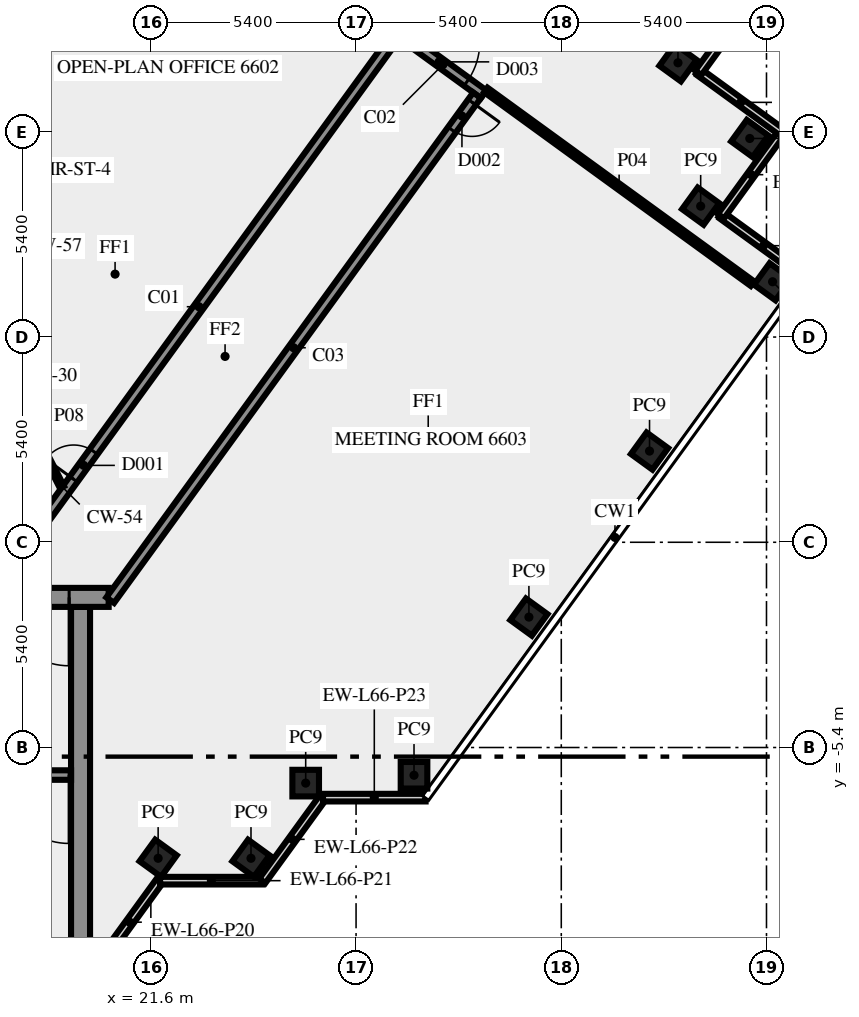
"""IFC4 building model, lengths in metres.
Left out: names, types, materials, properties, quantities, classifications, styles, units other than length and angle.
Written with IfcOpenShell. Run it as: python <this file> out.ifc"""

import sys

from ifc_helpers import new_model, si_unit, direction, frame, frame_2d, origin, origin_2d, place, context, subcontext, project, spatial, rectangle, extrude, element, fill, save


model = new_model("IFC4")
c1 = context("Model", 3, precision=1e-05, world=origin(), true_north=direction((0.0, 1.0)))
c2 = subcontext(c1, "Body", "Model", "MODEL_VIEW")
j1 = project(units=[si_unit("LENGTHUNIT", "METRE"), si_unit("PLANEANGLEUNIT", "RADIAN")], contexts=[c1])
p1 = place(None, origin())
s1 = spatial("IfcSite", under=j1, at=p1, CompositionType="ELEMENT")
p2 = place(p1, origin())
s2 = spatial("IfcBuilding", under=s1, at=p2, CompositionType="ELEMENT")
p3 = place(p2, frame((0.0, 0.0, 285.0)))
s3 = spatial("IfcBuildingStorey", under=s2, at=p3, CompositionType="ELEMENT", Elevation=285.0)
for number, where, z_axis, x_axis in (
    (1, (21.792, -8.315, 0.0), (0.0, 0.0, 1.0), (0.588, 0.809, 0.0)),
    (2, (24.235, -8.315, 0.0), (0.0, 0.0, 1.0), (0.588, 0.809, 0.0)),
    (3, (25.674, -6.337, 0.0), (0.0, 0.0, 1.0), (1.0, 0.0, 0.0)),
    (4, (28.525, -6.13, 0.0), (0.0, 0.0, 1.0), (1.0, 0.0, 0.0)),
    (5, (31.548, -1.969, 0.0), (0.0, 0.0, 1.0), (0.588, 0.809, 0.0)),
    (6, (34.722, 2.4, 0.0), (0.0, 0.0, 1.0), (0.588, 0.809, 0.0)),
    (7, (37.96, 6.855, 0.0), (0.0, 0.0, 1.0), (0.588, 0.809, 0.0)),
    (8, (36.068, 8.844, 0.0), (0.0, 0.0, 1.0), (0.588, 0.809, 0.0)),
    (9, (37.36, 10.625, 0.0), (0.0, 0.0, 1.0), (0.588, 0.809, 0.0)),
    (10, (35.471, 12.616, 0.0), (0.0, 0.0, 1.0), (-0.809, 0.588, 0.0)),
):
    element("IfcColumn", number, at=place(p3, frame(where, z_axis=z_axis, x_axis=x_axis)), inside=s3, PredefinedType="COLUMN", context=c2, shape_type="SweptSolid", body=[
        extrude(rectangle(XDim=0.7, YDim=0.7, at=origin_2d()), origin(), (0.0, 0.0, 1.0), 3.65),
    ])
p4 = place(p3, frame((20.253, -11.083, 0.0), z_axis=(0.0, 0.0, 1.0), x_axis=(0.587766567315, 0.809030569476, 0.0)))
e11 = element("IfcWall", 11, at=p4, inside=s3, PredefinedType="SOLIDWALL", context=c2, shape_type="SweptSolid", body=[
    extrude(rectangle(XDim=2.688, YDim=0.2, at=frame_2d((1.344, 0.0))), origin(), (0.0, 0.0, 1.0), 3.65),
])
p5 = place(p3, frame((21.843, -8.904, 0.0), z_axis=(0.0, 0.0, 1.0), x_axis=(1.0, 0.0, 0.0)))
e12 = element("IfcWall", 12, at=p5, inside=s3, PredefinedType="SOLIDWALL", context=c2, shape_type="SweptSolid", body=[
    extrude(rectangle(XDim=2.7, YDim=0.2, at=frame_2d((1.35, 0.0))), origin(), (0.0, 0.0, 1.0), 3.65),
])
p6 = place(p3, frame((24.533, -8.909, 0.0), z_axis=(0.0, 0.0, 1.0), x_axis=(0.587720002413, 0.809064397168, 0.0)))
e13 = element("IfcWall", 13, at=p6, inside=s3, PredefinedType="SOLIDWALL", context=c2, shape_type="SweptSolid", body=[
    extrude(rectangle(XDim=2.7, YDim=0.2, at=frame_2d((1.35, 0.0))), origin(), (0.0, 0.0, 1.0), 3.65),
])
for number, where, z_axis, x_axis in (
    (14, (26.13, -6.719, 0.0), (0.0, 0.0, 1.0), (1.0, 0.0, 0.0)),
    (15, (38.814, 7.01, 0.0), (0.0, 0.0, 1.0), (-0.809, 0.588, 0.0)),
    (16, (36.602, 8.58, 0.0), (0.0, 0.0, 1.0), (0.588, 0.809, 0.0)),
    (17, (38.216, 10.782, 0.0), (0.0, 0.0, 1.0), (-0.809, 0.588, 0.0)),
    (18, (36.005, 12.352, 0.0), (0.0, 0.0, 1.0), (0.588, 0.809, 0.0)),
):
    element("IfcWall", number, at=place(p3, frame(where, z_axis=z_axis, x_axis=x_axis)), inside=s3, PredefinedType="SOLIDWALL", context=c2, shape_type="SweptSolid", body=[
        extrude(rectangle(XDim=2.7, YDim=0.2, at=frame_2d((1.35, 0.0))), origin(), (0.0, 0.0, 1.0), 3.65),
    ])
p7 = place(p3, frame((19.75, -10.5, 0.0), z_axis=(0.0, 0.0, 1.0), x_axis=(0.0, 1.0, 0.0)))
e19 = element("IfcWall", 19, at=p7, inside=s3, PredefinedType="SHEAR", context=c2, shape_type="SweptSolid", body=[
    extrude(rectangle(XDim=8.8, YDim=0.5, at=frame_2d((4.4, 0.0))), origin(), (0.0, 0.0, 1.0), 3.65),
])
p8 = place(p3, frame((19.5, -6.125, 0.0), z_axis=(0.0, 0.0, 1.0), x_axis=(-1.0, 0.0, 0.0)))
e20 = element("IfcWall", 20, at=p8, inside=s3, PredefinedType="SHEAR", context=c2, shape_type="SweptSolid", body=[
    extrude(rectangle(XDim=8.05, YDim=0.25, at=frame_2d((4.025, 0.0))), origin(), (0.0, 0.0, 1.0), 3.65),
])
p9 = place(p8, frame((0.05, 0.0, 0.0)))
e21 = element("IfcOpeningElement", 21, at=p9, cuts=e20, PredefinedType="OPENING", context=c2, shape_type="SweptSolid", body=[
    extrude(rectangle(XDim=1.8, YDim=2.1, at=frame_2d((0.9, 1.05))), frame((0.0, 0.135, 0.0), z_axis=(0.0, -1.0, 0.0), x_axis=(1.0, 0.0, 0.0)), (0.0, 0.0, 1.0), 0.27),
])
p10 = place(p3, frame((20.49, -1.45, 0.0), z_axis=(0.0, 0.0, 1.0), x_axis=(-1.0, 0.0, 0.0)))
e22 = element("IfcWall", 22, at=p10, inside=s3, PredefinedType="SHEAR", context=c2, shape_type="SweptSolid", body=[
    extrude(rectangle(XDim=40.98, YDim=0.5, at=frame_2d((20.49, 0.0))), origin(), (0.0, 0.0, 1.0), 3.65),
])
p11 = place(p10, frame((38.14, 0.0, 0.0)))
e23 = element("IfcOpeningElement", 23, at=p11, cuts=e22, PredefinedType="OPENING", context=c2, shape_type="SweptSolid", body=[
    extrude(rectangle(XDim=1.8, YDim=2.1, at=frame_2d((0.9, 1.05))), frame((0.0, 0.26, 0.0), z_axis=(0.0, -1.0, 0.0), x_axis=(1.0, 0.0, 0.0)), (0.0, 0.0, 1.0), 0.52),
])
p12 = place(p10, frame((35.89, 0.0, 0.0)))
e24 = element("IfcOpeningElement", 24, at=p12, cuts=e22, PredefinedType="OPENING", context=c2, shape_type="SweptSolid", body=[
    extrude(rectangle(XDim=0.9, YDim=2.1, at=frame_2d((0.45, 1.05))), frame((0.0, 0.26, 0.0), z_axis=(0.0, -1.0, 0.0), x_axis=(1.0, 0.0, 0.0)), (0.0, 0.0, 1.0), 0.52),
])
p13 = place(p10, frame((32.94, 0.0, 0.0)))
e25 = element("IfcOpeningElement", 25, at=p13, cuts=e22, PredefinedType="OPENING", context=c2, shape_type="SweptSolid", body=[
    extrude(rectangle(XDim=0.9, YDim=2.1, at=frame_2d((0.45, 1.05))), frame((0.0, 0.26, 0.0), z_axis=(0.0, -1.0, 0.0), x_axis=(1.0, 0.0, 0.0)), (0.0, 0.0, 1.0), 0.52),
])
p14 = place(p10, frame((31.015, 0.0, 0.0)))
e26 = element("IfcOpeningElement", 26, at=p14, cuts=e22, PredefinedType="OPENING", context=c2, shape_type="SweptSolid", body=[
    extrude(rectangle(XDim=0.8, YDim=2.1, at=frame_2d((0.4, 1.05))), frame((0.0, 0.26, 0.0), z_axis=(0.0, -1.0, 0.0), x_axis=(1.0, 0.0, 0.0)), (0.0, 0.0, 1.0), 0.52),
])
p15 = place(p10, frame((24.765, 0.0, 0.0)))
e27 = element("IfcOpeningElement", 27, at=p15, cuts=e22, PredefinedType="OPENING", context=c2, shape_type="SweptSolid", body=[
    extrude(rectangle(XDim=0.8, YDim=2.1, at=frame_2d((0.4, 1.05))), frame((0.0, 0.26, 0.0), z_axis=(0.0, -1.0, 0.0), x_axis=(1.0, 0.0, 0.0)), (0.0, 0.0, 1.0), 0.52),
])
p16 = place(p10, frame((21.765, 0.0, 0.0)))
e28 = element("IfcOpeningElement", 28, at=p16, cuts=e22, PredefinedType="OPENING", context=c2, shape_type="SweptSolid", body=[
    extrude(rectangle(XDim=2.0, YDim=2.1, at=frame_2d((1.0, 1.05))), frame((0.0, 0.26, 0.0), z_axis=(0.0, -1.0, 0.0), x_axis=(1.0, 0.0, 0.0)), (0.0, 0.0, 1.0), 0.52),
])
p17 = place(p10, frame((15.202, 0.0, 0.0)))
e29 = element("IfcOpeningElement", 29, at=p17, cuts=e22, PredefinedType="OPENING", context=c2, shape_type="SweptSolid", body=[
    extrude(rectangle(XDim=0.9, YDim=2.1, at=frame_2d((0.45, 1.05))), frame((0.0, 0.26, 0.0), z_axis=(0.0, -1.0, 0.0), x_axis=(1.0, 0.0, 0.0)), (0.0, 0.0, 1.0), 0.52),
])
p18 = place(p10, frame((13.54, 0.0, 0.0)))
e30 = element("IfcOpeningElement", 30, at=p18, cuts=e22, PredefinedType="OPENING", context=c2, shape_type="SweptSolid", body=[
    extrude(rectangle(XDim=0.9, YDim=2.1, at=frame_2d((0.45, 1.05))), frame((0.0, 0.26, 0.0), z_axis=(0.0, -1.0, 0.0), x_axis=(1.0, 0.0, 0.0)), (0.0, 0.0, 1.0), 0.52),
])
p19 = place(p10, frame((11.64, 0.0, 0.0)))
e31 = element("IfcOpeningElement", 31, at=p19, cuts=e22, PredefinedType="OPENING", context=c2, shape_type="SweptSolid", body=[
    extrude(rectangle(XDim=0.9, YDim=2.1, at=frame_2d((0.45, 1.05))), frame((0.0, 0.26, 0.0), z_axis=(0.0, -1.0, 0.0), x_axis=(1.0, 0.0, 0.0)), (0.0, 0.0, 1.0), 0.52),
])
p20 = place(p10, frame((9.577, 0.0, 0.0)))
e32 = element("IfcOpeningElement", 32, at=p20, cuts=e22, PredefinedType="OPENING", context=c2, shape_type="SweptSolid", body=[
    extrude(rectangle(XDim=0.9, YDim=2.1, at=frame_2d((0.45, 1.05))), frame((0.0, 0.26, 0.0), z_axis=(0.0, -1.0, 0.0), x_axis=(1.0, 0.0, 0.0)), (0.0, 0.0, 1.0), 0.52),
])
p21 = place(p10, frame((7.14, 0.0, 0.0)))
e33 = element("IfcOpeningElement", 33, at=p21, cuts=e22, PredefinedType="OPENING", context=c2, shape_type="SweptSolid", body=[
    extrude(rectangle(XDim=0.9, YDim=2.1, at=frame_2d((0.45, 1.05))), frame((0.0, 0.26, 0.0), z_axis=(0.0, -1.0, 0.0), x_axis=(1.0, 0.0, 0.0)), (0.0, 0.0, 1.0), 0.52),
])
p22 = place(p10, frame((5.028, 0.0, 0.0)))
e34 = element("IfcOpeningElement", 34, at=p22, cuts=e22, PredefinedType="OPENING", context=c2, shape_type="SweptSolid", body=[
    extrude(rectangle(XDim=0.8, YDim=2.1, at=frame_2d((0.4, 1.05))), frame((0.0, 0.26, 0.0), z_axis=(0.0, -1.0, 0.0), x_axis=(1.0, 0.0, 0.0)), (0.0, 0.0, 1.0), 0.52),
])
p23 = place(p10, frame((3.452, 0.0, 0.0)))
e35 = element("IfcOpeningElement", 35, at=p23, cuts=e22, PredefinedType="OPENING", context=c2, shape_type="SweptSolid", body=[
    extrude(rectangle(XDim=0.8, YDim=2.1, at=frame_2d((0.4, 1.05))), frame((0.0, 0.26, 0.0), z_axis=(0.0, -1.0, 0.0), x_axis=(1.0, 0.0, 0.0)), (0.0, 0.0, 1.0), 0.52),
])
p24 = place(p10, frame((1.04, 0.0, 0.0)))
e36 = element("IfcOpeningElement", 36, at=p24, cuts=e22, PredefinedType="OPENING", context=c2, shape_type="SweptSolid", body=[
    extrude(rectangle(XDim=1.8, YDim=2.1, at=frame_2d((0.9, 1.05))), frame((0.0, 0.26, 0.0), z_axis=(0.0, -1.0, 0.0), x_axis=(1.0, 0.0, 0.0)), (0.0, 0.0, 1.0), 0.52),
])
p25 = place(p3, frame((17.545, -1.125, 0.0), z_axis=(0.0, 0.0, 1.0), x_axis=(0.58779555165, 0.809009511354, 0.0)))
e37 = element("IfcWall", 37, at=p25, inside=s3, PredefinedType="SOLIDWALL", context=c2, shape_type="SweptSolid", body=[
    extrude(rectangle(XDim=18.103, YDim=0.25, at=frame_2d((9.052, 0.0))), origin(), (0.0, 0.0, 1.0), 3.65),
])
p26 = place(p25, frame((3.441, 0.0, 0.0)))
e38 = element("IfcOpeningElement", 38, at=p26, cuts=e37, PredefinedType="OPENING", context=c2, shape_type="SweptSolid", body=[
    extrude(rectangle(XDim=0.9, YDim=2.1, at=frame_2d((0.45, 1.05))), frame((0.0, 0.135, 0.0), z_axis=(0.0, -1.0, 0.0), x_axis=(1.0, 0.0, 0.0)), (0.0, 0.0, 1.0), 0.27),
])
p27 = place(p3, frame((28.213, 13.346, 0.0), z_axis=(0.0, 0.0, 1.0), x_axis=(0.809006914995, -0.587799125119, 0.0)))
e39 = element("IfcWall", 39, at=p27, inside=s3, PredefinedType="SOLIDWALL", context=c2, shape_type="SweptSolid", body=[
    extrude(rectangle(XDim=2.65, YDim=0.25, at=frame_2d((1.325, 0.0))), origin(), (0.0, 0.0, 1.0), 3.65),
])
p28 = place(p27, frame((0.3, 0.0, 0.0)))
e40 = element("IfcOpeningElement", 40, at=p28, cuts=e39, PredefinedType="OPENING", context=c2, shape_type="SweptSolid", body=[
    extrude(rectangle(XDim=1.8, YDim=2.1, at=frame_2d((0.9, 1.05))), frame((0.0, 0.135, 0.0), z_axis=(0.0, -1.0, 0.0), x_axis=(1.0, 0.0, 0.0)), (0.0, 0.0, 1.0), 0.27),
])
p29 = place(p3, frame((30.183, 11.761, 0.0), z_axis=(0.0, 0.0, 1.0), x_axis=(-0.587781762867, -0.80901952958, 0.0)))
e41 = element("IfcWall", 41, at=p29, inside=s3, PredefinedType="SOLIDWALL", context=c2, shape_type="SweptSolid", body=[
    extrude(rectangle(XDim=16.42, YDim=0.25, at=frame_2d((8.21, 0.0))), origin(), (0.0, 0.0, 1.0), 3.65),
])
p30 = place(p29, frame((0.225, 0.0, 0.0)))
e42 = element("IfcOpeningElement", 42, at=p30, cuts=e41, PredefinedType="OPENING", context=c2, shape_type="SweptSolid", body=[
    extrude(rectangle(XDim=0.9, YDim=2.1, at=frame_2d((0.45, 1.05))), frame((0.0, 0.135, 0.0), z_axis=(0.0, -1.0, 0.0), x_axis=(1.0, 0.0, 0.0)), (0.0, 0.0, 1.0), 0.27),
])
p31 = place(p3, frame((30.415, 11.902, 0.0), z_axis=(0.0, 0.0, 1.0), x_axis=(0.809020922653, -0.587779845444, 0.0)))
e43 = element("IfcWall", 43, at=p31, inside=s3, PredefinedType="PARTITIONING", context=c2, shape_type="SweptSolid", body=[
    extrude(rectangle(XDim=8.67, YDim=0.15, at=frame_2d((4.335, 0.0))), origin(), (0.0, 0.0, 1.0), 3.65),
])
p32 = place(p3, frame((18.0, 3.925, 0.0), z_axis=(0.0, 0.0, 1.0), x_axis=(0.453950796792, -0.891026752736, 0.0)))
e44 = element("IfcWall", 44, at=p32, inside=s3, PredefinedType="PARTITIONING", context=c2, shape_type="SweptSolid", body=[
    extrude(rectangle(XDim=2.778, YDim=0.12, at=frame_2d((1.389, 0.0))), origin(), (0.0, 0.0, 1.0), 3.65),
])
p33 = place(p9, origin())
e45 = element("IfcDoor", 45, at=p33, inside=s3, OperationType="DOUBLE_DOOR_SINGLE_SWING", PredefinedType="DOOR", context=c2, shape_type="SweptSolid", body=[
    extrude(rectangle(XDim=1.8, YDim=2.1, at=frame_2d((0.9, 1.05))), frame((0.0, 0.025, 0.0), z_axis=(0.0, -1.0, 0.0), x_axis=(1.0, 0.0, 0.0)), (0.0, 0.0, 1.0), 0.05),
])
fill(e21, e45)
p34 = place(p24, origin())
e46 = element("IfcDoor", 46, at=p34, inside=s3, OperationType="DOUBLE_DOOR_SINGLE_SWING", PredefinedType="DOOR", context=c2, shape_type="SweptSolid", body=[
    extrude(rectangle(XDim=1.8, YDim=2.1, at=frame_2d((0.9, 1.05))), frame((0.0, 0.025, 0.0), z_axis=(0.0, -1.0, 0.0), x_axis=(1.0, 0.0, 0.0)), (0.0, 0.0, 1.0), 0.05),
])
fill(e36, e46)
p35 = place(p26, origin())
e47 = element("IfcDoor", 47, at=p35, inside=s3, OperationType="SINGLE_SWING_LEFT", PredefinedType="DOOR", context=c2, shape_type="SweptSolid", body=[
    extrude(rectangle(XDim=0.9, YDim=2.1, at=frame_2d((0.45, 1.05))), frame((0.0, 0.025, 0.0), z_axis=(0.0, -1.0, 0.0), x_axis=(1.0, 0.0, 0.0)), (0.0, 0.0, 1.0), 0.05),
])
fill(e38, e47)
p36 = place(p28, origin())
e48 = element("IfcDoor", 48, at=p36, inside=s3, OperationType="DOUBLE_DOOR_SINGLE_SWING", PredefinedType="DOOR", context=c2, shape_type="SweptSolid", body=[
    extrude(rectangle(XDim=1.8, YDim=2.1, at=frame_2d((0.9, 1.05))), frame((0.0, 0.025, 0.0), z_axis=(0.0, -1.0, 0.0), x_axis=(1.0, 0.0, 0.0)), (0.0, 0.0, 1.0), 0.05),
])
fill(e40, e48)
p37 = place(p30, origin())
e49 = element("IfcDoor", 49, at=p37, inside=s3, OperationType="SINGLE_SWING_LEFT", PredefinedType="DOOR", context=c2, shape_type="SweptSolid", body=[
    extrude(rectangle(XDim=0.9, YDim=2.1, at=frame_2d((0.45, 1.05))), frame((0.0, 0.025, 0.0), z_axis=(0.0, -1.0, 0.0), x_axis=(1.0, 0.0, 0.0)), (0.0, 0.0, 1.0), 0.05),
])
fill(e42, e49)
save(model, sys.argv[1])
